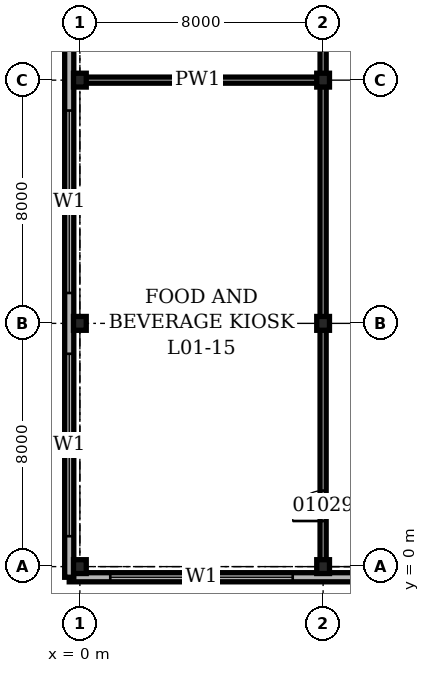
"""IFC4 building model, lengths in metres.
Left out: names, types, materials, properties, quantities, classifications, styles, units other than length and angle.
Written with IfcOpenShell. Run it as: python <this file> out.ifc"""

import sys

from ifc_helpers import new_model, si_unit, direction, frame, frame_2d, origin, origin_2d, place, context, subcontext, project, spatial, rectangle, i_section, extrude, element, fill, save


model = new_model("IFC4")
c1 = context("Model", 3, precision=1e-05, world=origin(), true_north=direction((0.0, 1.0)))
c2 = subcontext(c1, "Body", "Model", "MODEL_VIEW")
j1 = project(units=[si_unit("LENGTHUNIT", "METRE"), si_unit("PLANEANGLEUNIT", "RADIAN")], contexts=[c1])
p1 = place(None, origin())
s1 = spatial("IfcSite", under=j1, at=p1, CompositionType="ELEMENT")
p2 = place(p1, origin())
s2 = spatial("IfcBuilding", under=s1, at=p2, CompositionType="ELEMENT")
p3 = place(p2, frame((0.0, 0.0, 4.9)))
s3 = spatial("IfcBuildingStorey", under=s2, at=p3, CompositionType="ELEMENT", Elevation=4.9)
for number, where, z_axis, x_axis in (
    (1, (0.0, 0.0, 0.0), (0.0, 0.0, 1.0), (1.0, 0.0, 0.0)),
    (2, (0.0, 8.0, 0.0), (0.0, 0.0, 1.0), (1.0, 0.0, 0.0)),
    (3, (0.0, 16.0, 0.0), (0.0, 0.0, 1.0), (1.0, 0.0, 0.0)),
    (4, (8.0, 0.0, 0.0), (0.0, 0.0, 1.0), (1.0, 0.0, 0.0)),
    (5, (8.0, 8.0, 0.0), (0.0, 0.0, 1.0), (1.0, 0.0, 0.0)),
    (6, (8.0, 16.0, 0.0), (0.0, 0.0, 1.0), (1.0, 0.0, 0.0)),
):
    element("IfcColumn", number, at=place(p3, frame(where, z_axis=z_axis, x_axis=x_axis)), inside=s3, PredefinedType="COLUMN", context=c2, shape_type="SweptSolid", body=[
        extrude(i_section(OverallWidth=0.419, OverallDepth=0.455, WebThickness=0.042, FlangeThickness=0.068, at=origin_2d()), origin(), (0.0, 0.0, 1.0), 5.0),
    ])
p4 = place(p3, frame((-0.35, -0.35, 0.0), z_axis=(0.0, 0.0, 1.0), x_axis=(1.0, 0.0, 0.0)))
e7 = element("IfcWall", 7, at=p4, inside=s3, PredefinedType="SOLIDWALL", context=c2, shape_type="SweptSolid", body=[
    extrude(rectangle(XDim=112.7, YDim=0.3, at=frame_2d((56.35, 0.0))), origin(), (0.0, 0.0, 1.0), 5.0),
])
p5 = place(p4, frame((1.35, 0.0, 1.0)))
e8 = element("IfcOpeningElement", 8, at=p5, cuts=e7, PredefinedType="OPENING", context=c2, shape_type="SweptSolid", body=[
    extrude(rectangle(XDim=6.0, YDim=1.5, at=frame_2d((3.0, 0.75))), frame((0.0, 0.16, 0.0), z_axis=(0.0, -1.0, 0.0), x_axis=(1.0, 0.0, 0.0)), (0.0, 0.0, 1.0), 0.32),
])
p6 = place(p4, frame((9.35, 0.0, 1.0)))
e9 = element("IfcOpeningElement", 9, at=p6, cuts=e7, PredefinedType="OPENING", context=c2, shape_type="SweptSolid", body=[
    extrude(rectangle(XDim=6.0, YDim=1.5, at=frame_2d((3.0, 0.75))), frame((0.0, 0.16, 0.0), z_axis=(0.0, -1.0, 0.0), x_axis=(1.0, 0.0, 0.0)), (0.0, 0.0, 1.0), 0.32),
])
p7 = place(p4, frame((17.35, 0.0, 1.0)))
e10 = element("IfcOpeningElement", 10, at=p7, cuts=e7, PredefinedType="OPENING", context=c2, shape_type="SweptSolid", body=[
    extrude(rectangle(XDim=6.0, YDim=1.5, at=frame_2d((3.0, 0.75))), frame((0.0, 0.16, 0.0), z_axis=(0.0, -1.0, 0.0), x_axis=(1.0, 0.0, 0.0)), (0.0, 0.0, 1.0), 0.32),
])
p8 = place(p4, frame((25.35, 0.0, 1.0)))
e11 = element("IfcOpeningElement", 11, at=p8, cuts=e7, PredefinedType="OPENING", context=c2, shape_type="SweptSolid", body=[
    extrude(rectangle(XDim=6.0, YDim=1.5, at=frame_2d((3.0, 0.75))), frame((0.0, 0.16, 0.0), z_axis=(0.0, -1.0, 0.0), x_axis=(1.0, 0.0, 0.0)), (0.0, 0.0, 1.0), 0.32),
])
p9 = place(p4, frame((33.35, 0.0, 1.0)))
e12 = element("IfcOpeningElement", 12, at=p9, cuts=e7, PredefinedType="OPENING", context=c2, shape_type="SweptSolid", body=[
    extrude(rectangle(XDim=6.0, YDim=1.5, at=frame_2d((3.0, 0.75))), frame((0.0, 0.16, 0.0), z_axis=(0.0, -1.0, 0.0), x_axis=(1.0, 0.0, 0.0)), (0.0, 0.0, 1.0), 0.32),
])
p10 = place(p4, frame((41.35, 0.0, 1.0)))
e13 = element("IfcOpeningElement", 13, at=p10, cuts=e7, PredefinedType="OPENING", context=c2, shape_type="SweptSolid", body=[
    extrude(rectangle(XDim=6.0, YDim=1.5, at=frame_2d((3.0, 0.75))), frame((0.0, 0.16, 0.0), z_axis=(0.0, -1.0, 0.0), x_axis=(1.0, 0.0, 0.0)), (0.0, 0.0, 1.0), 0.32),
])
p11 = place(p4, frame((49.35, 0.0, 1.0)))
e14 = element("IfcOpeningElement", 14, at=p11, cuts=e7, PredefinedType="OPENING", context=c2, shape_type="SweptSolid", body=[
    extrude(rectangle(XDim=6.0, YDim=1.5, at=frame_2d((3.0, 0.75))), frame((0.0, 0.16, 0.0), z_axis=(0.0, -1.0, 0.0), x_axis=(1.0, 0.0, 0.0)), (0.0, 0.0, 1.0), 0.32),
])
p12 = place(p4, frame((57.35, 0.0, 1.0)))
e15 = element("IfcOpeningElement", 15, at=p12, cuts=e7, PredefinedType="OPENING", context=c2, shape_type="SweptSolid", body=[
    extrude(rectangle(XDim=6.0, YDim=1.5, at=frame_2d((3.0, 0.75))), frame((0.0, 0.16, 0.0), z_axis=(0.0, -1.0, 0.0), x_axis=(1.0, 0.0, 0.0)), (0.0, 0.0, 1.0), 0.32),
])
p13 = place(p4, frame((65.35, 0.0, 1.0)))
e16 = element("IfcOpeningElement", 16, at=p13, cuts=e7, PredefinedType="OPENING", context=c2, shape_type="SweptSolid", body=[
    extrude(rectangle(XDim=6.0, YDim=1.5, at=frame_2d((3.0, 0.75))), frame((0.0, 0.16, 0.0), z_axis=(0.0, -1.0, 0.0), x_axis=(1.0, 0.0, 0.0)), (0.0, 0.0, 1.0), 0.32),
])
p14 = place(p4, frame((73.35, 0.0, 1.0)))
e17 = element("IfcOpeningElement", 17, at=p14, cuts=e7, PredefinedType="OPENING", context=c2, shape_type="SweptSolid", body=[
    extrude(rectangle(XDim=6.0, YDim=1.5, at=frame_2d((3.0, 0.75))), frame((0.0, 0.16, 0.0), z_axis=(0.0, -1.0, 0.0), x_axis=(1.0, 0.0, 0.0)), (0.0, 0.0, 1.0), 0.32),
])
p15 = place(p4, frame((81.35, 0.0, 1.0)))
e18 = element("IfcOpeningElement", 18, at=p15, cuts=e7, PredefinedType="OPENING", context=c2, shape_type="SweptSolid", body=[
    extrude(rectangle(XDim=6.0, YDim=1.5, at=frame_2d((3.0, 0.75))), frame((0.0, 0.16, 0.0), z_axis=(0.0, -1.0, 0.0), x_axis=(1.0, 0.0, 0.0)), (0.0, 0.0, 1.0), 0.32),
])
p16 = place(p4, frame((89.35, 0.0, 1.0)))
e19 = element("IfcOpeningElement", 19, at=p16, cuts=e7, PredefinedType="OPENING", context=c2, shape_type="SweptSolid", body=[
    extrude(rectangle(XDim=6.0, YDim=1.5, at=frame_2d((3.0, 0.75))), frame((0.0, 0.16, 0.0), z_axis=(0.0, -1.0, 0.0), x_axis=(1.0, 0.0, 0.0)), (0.0, 0.0, 1.0), 0.32),
])
p17 = place(p4, frame((97.35, 0.0, 1.0)))
e20 = element("IfcOpeningElement", 20, at=p17, cuts=e7, PredefinedType="OPENING", context=c2, shape_type="SweptSolid", body=[
    extrude(rectangle(XDim=6.0, YDim=1.5, at=frame_2d((3.0, 0.75))), frame((0.0, 0.16, 0.0), z_axis=(0.0, -1.0, 0.0), x_axis=(1.0, 0.0, 0.0)), (0.0, 0.0, 1.0), 0.32),
])
p18 = place(p4, frame((105.35, 0.0, 1.0)))
e21 = element("IfcOpeningElement", 21, at=p18, cuts=e7, PredefinedType="OPENING", context=c2, shape_type="SweptSolid", body=[
    extrude(rectangle(XDim=6.0, YDim=1.5, at=frame_2d((3.0, 0.75))), frame((0.0, 0.16, 0.0), z_axis=(0.0, -1.0, 0.0), x_axis=(1.0, 0.0, 0.0)), (0.0, 0.0, 1.0), 0.32),
])
p19 = place(p3, frame((-0.35, 112.35, 0.0), z_axis=(0.0, 0.0, 1.0), x_axis=(0.0, -1.0, 0.0)))
e22 = element("IfcWall", 22, at=p19, inside=s3, PredefinedType="SOLIDWALL", context=c2, shape_type="SweptSolid", body=[
    extrude(rectangle(XDim=112.7, YDim=0.3, at=frame_2d((56.35, 0.0))), origin(), (0.0, 0.0, 1.0), 5.0),
])
p20 = place(p19, frame((1.35, 0.0, 1.0)))
e23 = element("IfcOpeningElement", 23, at=p20, cuts=e22, PredefinedType="OPENING", context=c2, shape_type="SweptSolid", body=[
    extrude(rectangle(XDim=6.0, YDim=1.5, at=frame_2d((3.0, 0.75))), frame((0.0, 0.16, 0.0), z_axis=(0.0, -1.0, 0.0), x_axis=(1.0, 0.0, 0.0)), (0.0, 0.0, 1.0), 0.32),
])
p21 = place(p19, frame((9.35, 0.0, 1.0)))
e24 = element("IfcOpeningElement", 24, at=p21, cuts=e22, PredefinedType="OPENING", context=c2, shape_type="SweptSolid", body=[
    extrude(rectangle(XDim=6.0, YDim=1.5, at=frame_2d((3.0, 0.75))), frame((0.0, 0.16, 0.0), z_axis=(0.0, -1.0, 0.0), x_axis=(1.0, 0.0, 0.0)), (0.0, 0.0, 1.0), 0.32),
])
p22 = place(p19, frame((17.35, 0.0, 1.0)))
e25 = element("IfcOpeningElement", 25, at=p22, cuts=e22, PredefinedType="OPENING", context=c2, shape_type="SweptSolid", body=[
    extrude(rectangle(XDim=6.0, YDim=1.5, at=frame_2d((3.0, 0.75))), frame((0.0, 0.16, 0.0), z_axis=(0.0, -1.0, 0.0), x_axis=(1.0, 0.0, 0.0)), (0.0, 0.0, 1.0), 0.32),
])
p23 = place(p19, frame((25.35, 0.0, 1.0)))
e26 = element("IfcOpeningElement", 26, at=p23, cuts=e22, PredefinedType="OPENING", context=c2, shape_type="SweptSolid", body=[
    extrude(rectangle(XDim=6.0, YDim=1.5, at=frame_2d((3.0, 0.75))), frame((0.0, 0.16, 0.0), z_axis=(0.0, -1.0, 0.0), x_axis=(1.0, 0.0, 0.0)), (0.0, 0.0, 1.0), 0.32),
])
p24 = place(p19, frame((33.35, 0.0, 1.0)))
e27 = element("IfcOpeningElement", 27, at=p24, cuts=e22, PredefinedType="OPENING", context=c2, shape_type="SweptSolid", body=[
    extrude(rectangle(XDim=6.0, YDim=1.5, at=frame_2d((3.0, 0.75))), frame((0.0, 0.16, 0.0), z_axis=(0.0, -1.0, 0.0), x_axis=(1.0, 0.0, 0.0)), (0.0, 0.0, 1.0), 0.32),
])
p25 = place(p19, frame((41.35, 0.0, 1.0)))
e28 = element("IfcOpeningElement", 28, at=p25, cuts=e22, PredefinedType="OPENING", context=c2, shape_type="SweptSolid", body=[
    extrude(rectangle(XDim=6.0, YDim=1.5, at=frame_2d((3.0, 0.75))), frame((0.0, 0.16, 0.0), z_axis=(0.0, -1.0, 0.0), x_axis=(1.0, 0.0, 0.0)), (0.0, 0.0, 1.0), 0.32),
])
p26 = place(p19, frame((49.35, 0.0, 1.0)))
e29 = element("IfcOpeningElement", 29, at=p26, cuts=e22, PredefinedType="OPENING", context=c2, shape_type="SweptSolid", body=[
    extrude(rectangle(XDim=6.0, YDim=1.5, at=frame_2d((3.0, 0.75))), frame((0.0, 0.16, 0.0), z_axis=(0.0, -1.0, 0.0), x_axis=(1.0, 0.0, 0.0)), (0.0, 0.0, 1.0), 0.32),
])
p27 = place(p19, frame((57.35, 0.0, 1.0)))
e30 = element("IfcOpeningElement", 30, at=p27, cuts=e22, PredefinedType="OPENING", context=c2, shape_type="SweptSolid", body=[
    extrude(rectangle(XDim=6.0, YDim=1.5, at=frame_2d((3.0, 0.75))), frame((0.0, 0.16, 0.0), z_axis=(0.0, -1.0, 0.0), x_axis=(1.0, 0.0, 0.0)), (0.0, 0.0, 1.0), 0.32),
])
p28 = place(p19, frame((65.35, 0.0, 1.0)))
e31 = element("IfcOpeningElement", 31, at=p28, cuts=e22, PredefinedType="OPENING", context=c2, shape_type="SweptSolid", body=[
    extrude(rectangle(XDim=6.0, YDim=1.5, at=frame_2d((3.0, 0.75))), frame((0.0, 0.16, 0.0), z_axis=(0.0, -1.0, 0.0), x_axis=(1.0, 0.0, 0.0)), (0.0, 0.0, 1.0), 0.32),
])
p29 = place(p19, frame((73.35, 0.0, 1.0)))
e32 = element("IfcOpeningElement", 32, at=p29, cuts=e22, PredefinedType="OPENING", context=c2, shape_type="SweptSolid", body=[
    extrude(rectangle(XDim=6.0, YDim=1.5, at=frame_2d((3.0, 0.75))), frame((0.0, 0.16, 0.0), z_axis=(0.0, -1.0, 0.0), x_axis=(1.0, 0.0, 0.0)), (0.0, 0.0, 1.0), 0.32),
])
p30 = place(p19, frame((81.35, 0.0, 1.0)))
e33 = element("IfcOpeningElement", 33, at=p30, cuts=e22, PredefinedType="OPENING", context=c2, shape_type="SweptSolid", body=[
    extrude(rectangle(XDim=6.0, YDim=1.5, at=frame_2d((3.0, 0.75))), frame((0.0, 0.16, 0.0), z_axis=(0.0, -1.0, 0.0), x_axis=(1.0, 0.0, 0.0)), (0.0, 0.0, 1.0), 0.32),
])
p31 = place(p19, frame((89.35, 0.0, 1.0)))
e34 = element("IfcOpeningElement", 34, at=p31, cuts=e22, PredefinedType="OPENING", context=c2, shape_type="SweptSolid", body=[
    extrude(rectangle(XDim=6.0, YDim=1.5, at=frame_2d((3.0, 0.75))), frame((0.0, 0.16, 0.0), z_axis=(0.0, -1.0, 0.0), x_axis=(1.0, 0.0, 0.0)), (0.0, 0.0, 1.0), 0.32),
])
p32 = place(p19, frame((97.35, 0.0, 1.0)))
e35 = element("IfcOpeningElement", 35, at=p32, cuts=e22, PredefinedType="OPENING", context=c2, shape_type="SweptSolid", body=[
    extrude(rectangle(XDim=6.0, YDim=1.5, at=frame_2d((3.0, 0.75))), frame((0.0, 0.16, 0.0), z_axis=(0.0, -1.0, 0.0), x_axis=(1.0, 0.0, 0.0)), (0.0, 0.0, 1.0), 0.32),
])
p33 = place(p19, frame((105.35, 0.0, 1.0)))
e36 = element("IfcOpeningElement", 36, at=p33, cuts=e22, PredefinedType="OPENING", context=c2, shape_type="SweptSolid", body=[
    extrude(rectangle(XDim=6.0, YDim=1.5, at=frame_2d((3.0, 0.75))), frame((0.0, 0.16, 0.0), z_axis=(0.0, -1.0, 0.0), x_axis=(1.0, 0.0, 0.0)), (0.0, 0.0, 1.0), 0.32),
])
p34 = place(p3, frame((-0.15, 16.0, 0.0), z_axis=(0.0, 0.0, 1.0), x_axis=(1.0, 0.0, 0.0)))
e37 = element("IfcWall", 37, at=p34, inside=s3, PredefinedType="PARTITIONING", context=c2, shape_type="SweptSolid", body=[
    extrude(rectangle(XDim=8.05, YDim=0.2, at=frame_2d((4.025, 0.0))), origin(), (0.0, 0.0, 1.0), 4.028),
])
p35 = place(p3, frame((8.0, -0.15, 0.0), z_axis=(0.0, 0.0, 1.0), x_axis=(0.0, 1.0, 0.0)))
e38 = element("IfcWall", 38, at=p35, inside=s3, PredefinedType="PARTITIONING", context=c2, shape_type="SweptSolid", body=[
    extrude(rectangle(XDim=40.05, YDim=0.2, at=frame_2d((20.025, 0.0))), origin(), (0.0, 0.0, 1.0), 4.028),
])
p36 = place(p35, frame((17.55, 0.0, 0.0)))
e39 = element("IfcOpeningElement", 39, at=p36, cuts=e38, PredefinedType="OPENING", context=c2, shape_type="SweptSolid", body=[
    extrude(rectangle(XDim=1.2, YDim=2.1, at=frame_2d((0.6, 1.05))), frame((0.0, 0.11, 0.0), z_axis=(0.0, -1.0, 0.0), x_axis=(1.0, 0.0, 0.0)), (0.0, 0.0, 1.0), 0.22),
])
p37 = place(p35, frame((27.05, 0.0, 0.0)))
e40 = element("IfcOpeningElement", 40, at=p37, cuts=e38, PredefinedType="OPENING", context=c2, shape_type="SweptSolid", body=[
    extrude(rectangle(XDim=1.2, YDim=2.1, at=frame_2d((0.6, 1.05))), frame((0.0, 0.11, 0.0), z_axis=(0.0, -1.0, 0.0), x_axis=(1.0, 0.0, 0.0)), (0.0, 0.0, 1.0), 0.22),
])
p38 = place(p35, frame((33.55, 0.0, 0.0)))
e41 = element("IfcOpeningElement", 41, at=p38, cuts=e38, PredefinedType="OPENING", context=c2, shape_type="SweptSolid", body=[
    extrude(rectangle(XDim=1.2, YDim=2.1, at=frame_2d((0.6, 1.05))), frame((0.0, 0.11, 0.0), z_axis=(0.0, -1.0, 0.0), x_axis=(1.0, 0.0, 0.0)), (0.0, 0.0, 1.0), 0.22),
])
p39 = place(p35, frame((1.65, 0.0, 0.0)))
e42 = element("IfcOpeningElement", 42, at=p39, cuts=e38, PredefinedType="OPENING", context=c2, shape_type="SweptSolid", body=[
    extrude(rectangle(XDim=1.0, YDim=2.1, at=frame_2d((0.5, 1.05))), frame((0.0, 0.11, 0.0), z_axis=(0.0, -1.0, 0.0), x_axis=(1.0, 0.0, 0.0)), (0.0, 0.0, 1.0), 0.22),
])
p40 = place(p35, frame((37.65, 0.0, 0.0)))
e43 = element("IfcOpeningElement", 43, at=p40, cuts=e38, PredefinedType="OPENING", context=c2, shape_type="SweptSolid", body=[
    extrude(rectangle(XDim=1.0, YDim=2.1, at=frame_2d((0.5, 1.05))), frame((0.0, 0.11, 0.0), z_axis=(0.0, -1.0, 0.0), x_axis=(1.0, 0.0, 0.0)), (0.0, 0.0, 1.0), 0.22),
])
p41 = place(p5, origin())
e44 = element("IfcWindow", 44, at=p41, inside=s3, PartitioningType="SINGLE_PANEL", PredefinedType="WINDOW", context=c2, shape_type="SweptSolid", body=[
    extrude(rectangle(XDim=6.0, YDim=1.5, at=frame_2d((3.0, 0.75))), frame((0.0, 0.03, 0.0), z_axis=(0.0, -1.0, 0.0), x_axis=(1.0, 0.0, 0.0)), (0.0, 0.0, 1.0), 0.06),
])
fill(e8, e44)
p42 = place(p32, origin())
e45 = element("IfcWindow", 45, at=p42, inside=s3, PartitioningType="SINGLE_PANEL", PredefinedType="WINDOW", context=c2, shape_type="SweptSolid", body=[
    extrude(rectangle(XDim=6.0, YDim=1.5, at=frame_2d((3.0, 0.75))), frame((0.0, 0.03, 0.0), z_axis=(0.0, -1.0, 0.0), x_axis=(1.0, 0.0, 0.0)), (0.0, 0.0, 1.0), 0.06),
])
fill(e35, e45)
p43 = place(p33, origin())
e46 = element("IfcWindow", 46, at=p43, inside=s3, PartitioningType="SINGLE_PANEL", PredefinedType="WINDOW", context=c2, shape_type="SweptSolid", body=[
    extrude(rectangle(XDim=6.0, YDim=1.5, at=frame_2d((3.0, 0.75))), frame((0.0, 0.03, 0.0), z_axis=(0.0, -1.0, 0.0), x_axis=(1.0, 0.0, 0.0)), (0.0, 0.0, 1.0), 0.06),
])
fill(e36, e46)
p44 = place(p39, origin())
e47 = element("IfcDoor", 47, at=p44, inside=s3, OperationType="SINGLE_SWING_LEFT", PredefinedType="DOOR", context=c2, shape_type="SweptSolid", body=[
    extrude(rectangle(XDim=1.0, YDim=2.1, at=frame_2d((0.5, 1.05))), frame((0.0, 0.1, 0.0), z_axis=(0.0, -1.0, 0.0), x_axis=(1.0, 0.0, 0.0)), (0.0, 0.0, 1.0), 0.199),
])
fill(e42, e47)
save(model, sys.argv[1])
